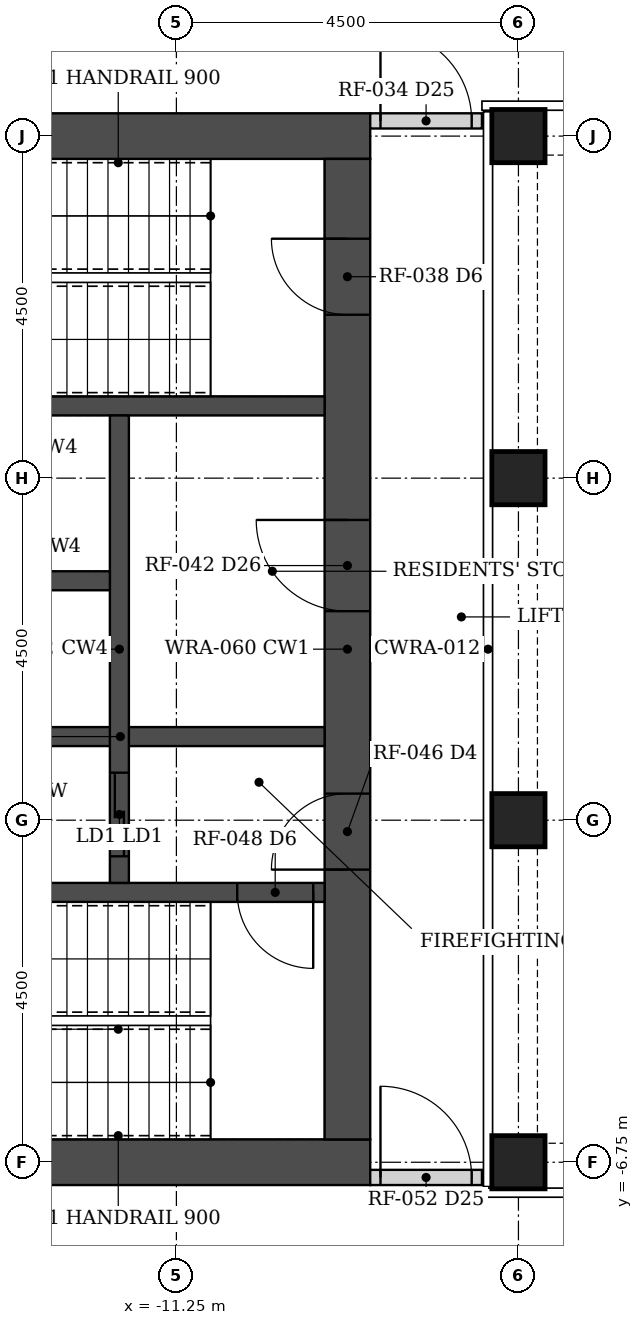
"""IFC4 building model, lengths in metres.
Left out: names, types, materials, properties, quantities, classifications, styles, units other than length and angle.
Written with IfcOpenShell. Run it as: python <this file> out.ifc"""

import sys

from ifc_helpers import new_model, si_unit, direction, frame, frame_2d, origin, origin_2d, place, context, subcontext, project, spatial, rectangle, hollow_rectangle, extrude, element, fill, save


model = new_model("IFC4")
c1 = context("Model", 3, precision=1e-05, world=origin(), true_north=direction((0.0, 1.0)))
c2 = subcontext(c1, "Body", "Model", "MODEL_VIEW")
j1 = project(units=[si_unit("LENGTHUNIT", "METRE"), si_unit("PLANEANGLEUNIT", "RADIAN")], contexts=[c1])
p1 = place(None, origin())
s1 = spatial("IfcSite", under=j1, at=p1, CompositionType="ELEMENT")
p2 = place(p1, origin())
s2 = spatial("IfcBuilding", under=s1, at=p2, CompositionType="ELEMENT")
p3 = place(p2, frame((0.0, 0.0, 79.0)))
s3 = spatial("IfcBuildingStorey", under=s2, at=p3, CompositionType="ELEMENT", Elevation=79.0)
for number, where, z_axis, x_axis in (
    (1, (-6.75, -6.75, 0.0), (0.0, 0.0, 1.0), (1.0, 0.0, 0.0)),
    (2, (-6.75, -2.25, 0.0), (0.0, 0.0, 1.0), (1.0, 0.0, 0.0)),
    (3, (-6.75, 2.25, 0.0), (0.0, 0.0, 1.0), (1.0, 0.0, 0.0)),
    (4, (-6.75, 6.75, 0.0), (0.0, 0.0, 1.0), (1.0, 0.0, 0.0)),
):
    element("IfcColumn", number, at=place(p3, frame(where, z_axis=z_axis, x_axis=x_axis)), inside=s3, PredefinedType="COLUMN", context=c2, shape_type="SweptSolid", body=[
        extrude(hollow_rectangle(XDim=0.7, YDim=0.7, WallThickness=0.05, at=origin_2d()), origin(), (0.0, 0.0, 1.0), 3.5),
    ])
for number, where, z_axis, x_axis in (
    (5, (-8.7, -6.75, 0.0), (0.0, 0.0, 1.0), (-1.0, 0.0, 0.0)),
    (6, (-8.7, 6.75, 0.0), (0.0, 0.0, 1.0), (-1.0, 0.0, 0.0)),
):
    element("IfcWall", number, at=place(p3, frame(where, z_axis=z_axis, x_axis=x_axis)), inside=s3, PredefinedType="SHEAR", context=c2, shape_type="SweptSolid", body=[
        extrude(rectangle(XDim=9.6, YDim=0.6, at=frame_2d((4.8, 0.0))), origin(), (0.0, 0.0, 1.0), 3.5),
    ])
p4 = place(p3, frame((-9.0, -6.45, 0.0), z_axis=(0.0, 0.0, 1.0), x_axis=(0.0, 1.0, 0.0)))
e7 = element("IfcWall", 7, at=p4, inside=s3, PredefinedType="SHEAR", context=c2, shape_type="SweptSolid", body=[
    extrude(rectangle(XDim=12.9, YDim=0.6, at=frame_2d((6.45, 0.0))), origin(), (0.0, 0.0, 1.0), 3.5),
])
p5 = place(p4, frame((3.55, 0.0, 0.0)))
e8 = element("IfcOpeningElement", 8, at=p5, cuts=e7, PredefinedType="OPENING", context=c2, shape_type="SweptSolid", body=[
    extrude(rectangle(XDim=1.0, YDim=2.1, at=frame_2d((0.5, 1.05))), frame((0.0, 0.31, 0.0), z_axis=(0.0, -1.0, 0.0), x_axis=(1.0, 0.0, 0.0)), (0.0, 0.0, 1.0), 0.62),
])
p6 = place(p4, frame((6.95, 0.0, 0.0)))
e9 = element("IfcOpeningElement", 9, at=p6, cuts=e7, PredefinedType="OPENING", context=c2, shape_type="SweptSolid", body=[
    extrude(rectangle(XDim=1.2, YDim=2.1, at=frame_2d((0.6, 1.05))), frame((0.0, 0.31, 0.0), z_axis=(0.0, -1.0, 0.0), x_axis=(1.0, 0.0, 0.0)), (0.0, 0.0, 1.0), 0.62),
])
p7 = place(p4, frame((10.85, 0.0, 0.0)))
e10 = element("IfcOpeningElement", 10, at=p7, cuts=e7, PredefinedType="OPENING", context=c2, shape_type="SweptSolid", body=[
    extrude(rectangle(XDim=1.0, YDim=2.1, at=frame_2d((0.5, 1.05))), frame((0.0, 0.31, 0.0), z_axis=(0.0, -1.0, 0.0), x_axis=(1.0, 0.0, 0.0)), (0.0, 0.0, 1.0), 0.62),
])
p8 = place(p3, frame((-9.3, -3.2, 0.0), z_axis=(0.0, 0.0, 1.0), x_axis=(-1.0, 0.0, 0.0)))
e11 = element("IfcWall", 11, at=p8, inside=s3, PredefinedType="SHEAR", context=c2, shape_type="SweptSolid", body=[
    extrude(rectangle(XDim=8.4, YDim=0.25, at=frame_2d((4.2, 0.0))), origin(), (0.0, 0.0, 1.0), 3.5),
])
p9 = place(p8, frame((0.15, 0.0, 0.0)))
e12 = element("IfcOpeningElement", 12, at=p9, cuts=e11, PredefinedType="OPENING", context=c2, shape_type="SweptSolid", body=[
    extrude(rectangle(XDim=1.0, YDim=2.1, at=frame_2d((0.5, 1.05))), frame((0.0, 0.135, 0.0), z_axis=(0.0, -1.0, 0.0), x_axis=(1.0, 0.0, 0.0)), (0.0, 0.0, 1.0), 0.27),
])
p10 = place(p3, frame((-9.3, 3.2, 0.0), z_axis=(0.0, 0.0, 1.0), x_axis=(-1.0, 0.0, 0.0)))
e13 = element("IfcWall", 13, at=p10, inside=s3, PredefinedType="SHEAR", context=c2, shape_type="SweptSolid", body=[
    extrude(rectangle(XDim=8.4, YDim=0.25, at=frame_2d((4.2, 0.0))), origin(), (0.0, 0.0, 1.0), 3.5),
])
p11 = place(p3, frame((-9.3, -1.15, 0.0), z_axis=(0.0, 0.0, 1.0), x_axis=(-1.0, 0.0, 0.0)))
e14 = element("IfcWall", 14, at=p11, inside=s3, PredefinedType="SHEAR", context=c2, shape_type="SweptSolid", body=[
    extrude(rectangle(XDim=5.375, YDim=0.25, at=frame_2d((2.688, 0.0))), origin(), (0.0, 0.0, 1.0), 3.5),
])
p12 = place(p3, frame((-12.0, -3.075, 0.0), z_axis=(0.0, 0.0, 1.0), x_axis=(0.0, 1.0, 0.0)))
e15 = element("IfcWall", 15, at=p12, inside=s3, PredefinedType="SHEAR", context=c2, shape_type="SweptSolid", body=[
    extrude(rectangle(XDim=6.15, YDim=0.25, at=frame_2d((3.075, 0.0))), origin(), (0.0, 0.0, 1.0), 3.5),
])
p13 = place(p12, frame((0.35, 0.0, 0.0)))
e16 = element("IfcOpeningElement", 16, at=p13, cuts=e15, PredefinedType="OPENING", context=c2, shape_type="SweptSolid", body=[
    extrude(rectangle(XDim=1.1, YDim=2.1, at=frame_2d((0.55, 1.05))), frame((0.0, 0.135, 0.0), z_axis=(0.0, -1.0, 0.0), x_axis=(1.0, 0.0, 0.0)), (0.0, 0.0, 1.0), 0.27),
])
p14 = place(p3, frame((-12.125, 0.9, 0.0), z_axis=(0.0, 0.0, 1.0), x_axis=(-1.0, 0.0, 0.0)))
e17 = element("IfcWall", 17, at=p14, inside=s3, PredefinedType="SHEAR", context=c2, shape_type="SweptSolid", body=[
    extrude(rectangle(XDim=2.55, YDim=0.25, at=frame_2d((1.275, 0.0))), origin(), (0.0, 0.0, 1.0), 3.5),
])
p15 = place(p3, frame((-8.7, 6.95, 0.0), z_axis=(0.0, 0.0, 1.0), x_axis=(1.0, 0.0, 0.0)))
e18 = element("IfcWall", 18, at=p15, inside=s3, PredefinedType="PARTITIONING", context=c2, shape_type="SweptSolid", body=[
    extrude(rectangle(XDim=1.47, YDim=0.2, at=frame_2d((0.735, 0.0))), origin(), (0.0, 0.0, 1.0), 2.373),
])
p16 = place(p15, frame((0.135, 0.0, 0.0)))
e19 = element("IfcOpeningElement", 19, at=p16, cuts=e18, PredefinedType="OPENING", context=c2, shape_type="SweptSolid", body=[
    extrude(rectangle(XDim=1.2, YDim=2.1, at=frame_2d((0.6, 1.05))), frame((0.0, 0.11, 0.0), z_axis=(0.0, -1.0, 0.0), x_axis=(1.0, 0.0, 0.0)), (0.0, 0.0, 1.0), 0.22),
])
p17 = place(p3, frame((-8.7, -6.95, 0.0), z_axis=(0.0, 0.0, 1.0), x_axis=(1.0, 0.0, 0.0)))
e20 = element("IfcWall", 20, at=p17, inside=s3, PredefinedType="PARTITIONING", context=c2, shape_type="SweptSolid", body=[
    extrude(rectangle(XDim=1.47, YDim=0.2, at=frame_2d((0.735, 0.0))), origin(), (0.0, 0.0, 1.0), 2.373),
])
p18 = place(p17, frame((0.135, 0.0, 0.0)))
e21 = element("IfcOpeningElement", 21, at=p18, cuts=e20, PredefinedType="OPENING", context=c2, shape_type="SweptSolid", body=[
    extrude(rectangle(XDim=1.2, YDim=2.1, at=frame_2d((0.6, 1.05))), frame((0.0, 0.11, 0.0), z_axis=(0.0, -1.0, 0.0), x_axis=(1.0, 0.0, 0.0)), (0.0, 0.0, 1.0), 0.22),
])
p19 = place(p16, origin())
e22 = element("IfcDoor", 22, at=p19, inside=s3, OperationType="DOUBLE_DOOR_DOUBLE_SWING", PredefinedType="DOOR", context=c2, shape_type="SweptSolid", body=[
    extrude(rectangle(XDim=1.2, YDim=2.1, at=frame_2d((0.6, 1.05))), frame((0.0, 0.025, 0.0), z_axis=(0.0, -1.0, 0.0), x_axis=(1.0, 0.0, 0.0)), (0.0, 0.0, 1.0), 0.05),
])
fill(e19, e22)
p20 = place(p18, origin())
e23 = element("IfcDoor", 23, at=p20, inside=s3, OperationType="DOUBLE_DOOR_DOUBLE_SWING", PredefinedType="DOOR", context=c2, shape_type="SweptSolid", body=[
    extrude(rectangle(XDim=1.2, YDim=2.1, at=frame_2d((0.6, 1.05))), frame((0.0, 0.025, 0.0), z_axis=(0.0, -1.0, 0.0), x_axis=(1.0, 0.0, 0.0)), (0.0, 0.0, 1.0), 0.05),
])
fill(e21, e23)
p21 = place(p5, origin())
e24 = element("IfcDoor", 24, at=p21, inside=s3, OperationType="SINGLE_SWING_LEFT", PredefinedType="DOOR", context=c2, shape_type="SweptSolid", body=[
    extrude(rectangle(XDim=1.0, YDim=2.1, at=frame_2d((0.5, 1.05))), frame((0.0, 0.025, 0.0), z_axis=(0.0, -1.0, 0.0), x_axis=(1.0, 0.0, 0.0)), (0.0, 0.0, 1.0), 0.05),
])
fill(e8, e24)
p22 = place(p9, origin())
e25 = element("IfcDoor", 25, at=p22, inside=s3, OperationType="SINGLE_SWING_LEFT", PredefinedType="DOOR", context=c2, shape_type="SweptSolid", body=[
    extrude(rectangle(XDim=1.0, YDim=2.1, at=frame_2d((0.5, 1.05))), frame((0.0, 0.025, 0.0), z_axis=(0.0, -1.0, 0.0), x_axis=(1.0, 0.0, 0.0)), (0.0, 0.0, 1.0), 0.05),
])
fill(e12, e25)
p23 = place(p6, origin())
e26 = element("IfcDoor", 26, at=p23, inside=s3, OperationType="SINGLE_SWING_RIGHT", PredefinedType="DOOR", context=c2, shape_type="SweptSolid", body=[
    extrude(rectangle(XDim=1.2, YDim=2.1, at=frame_2d((0.6, 1.05))), frame((0.0, 0.025, 0.0), z_axis=(0.0, -1.0, 0.0), x_axis=(1.0, 0.0, 0.0)), (0.0, 0.0, 1.0), 0.05),
])
fill(e9, e26)
p24 = place(p7, origin())
e27 = element("IfcDoor", 27, at=p24, inside=s3, OperationType="SINGLE_SWING_RIGHT", PredefinedType="DOOR", context=c2, shape_type="SweptSolid", body=[
    extrude(rectangle(XDim=1.0, YDim=2.1, at=frame_2d((0.5, 1.05))), frame((0.0, 0.025, 0.0), z_axis=(0.0, -1.0, 0.0), x_axis=(1.0, 0.0, 0.0)), (0.0, 0.0, 1.0), 0.05),
])
fill(e10, e27)
p25 = place(p13, origin())
e28 = element("IfcDoor", 28, at=p25, inside=s3, OperationType="DOUBLE_DOOR_SLIDING", PredefinedType="DOOR", context=c2, shape_type="SweptSolid", body=[
    extrude(rectangle(XDim=1.1, YDim=2.1, at=frame_2d((0.55, 1.05))), frame((0.0, 0.025, 0.0), z_axis=(0.0, -1.0, 0.0), x_axis=(1.0, 0.0, 0.0)), (0.0, 0.0, 1.0), 0.05),
])
fill(e16, e28)
save(model, sys.argv[1])
